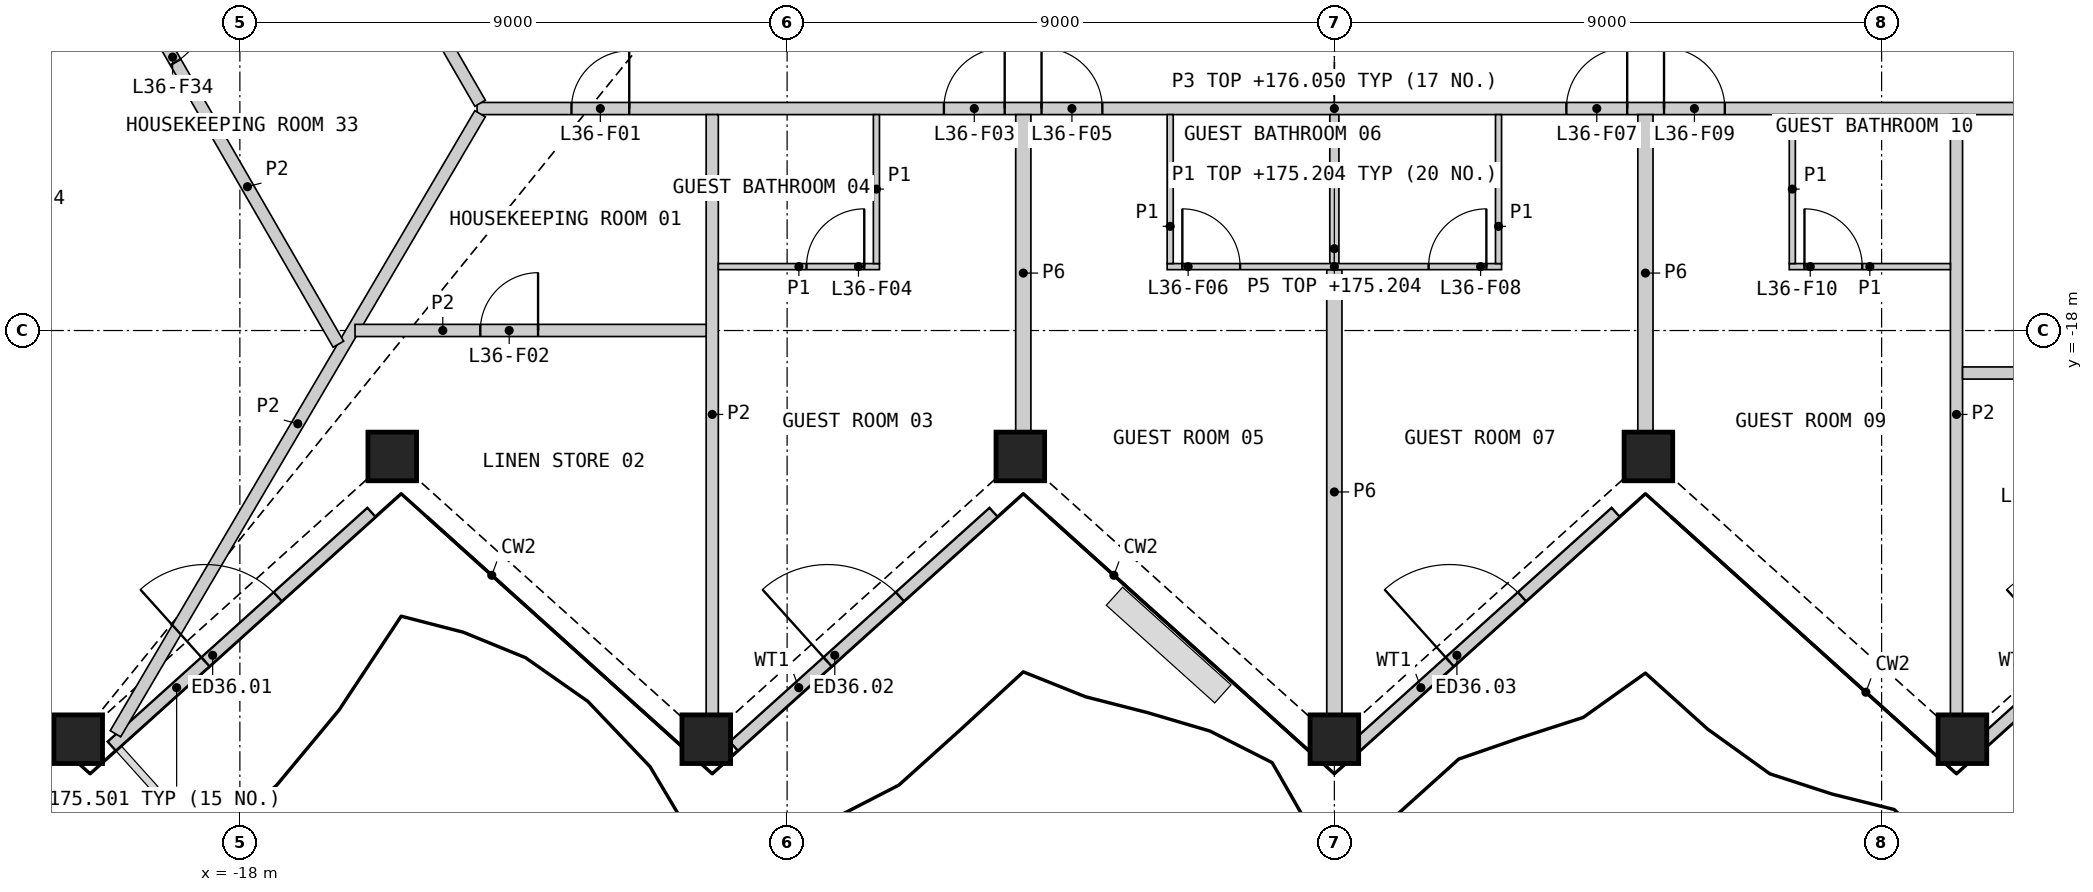
"""IFC4 building model, lengths in metres.
Left out: names, types, materials, properties, quantities, classifications, styles, units other than length and angle.
Written with IfcOpenShell. Run it as: python <this file> out.ifc"""

import sys

from ifc_helpers import new_model, si_unit, direction, frame, frame_2d, origin, origin_2d, place, context, subcontext, project, spatial, rectangle, hollow_rectangle, extrude, element, fill, save


model = new_model("IFC4")
c1 = context("Model", 3, precision=1e-05, world=origin(), true_north=direction((0.0, 1.0)))
c2 = subcontext(c1, "Body", "Model", "MODEL_VIEW")
j1 = project(units=[si_unit("LENGTHUNIT", "METRE"), si_unit("PLANEANGLEUNIT", "RADIAN")], contexts=[c1])
p1 = place(None, origin())
s1 = spatial("IfcSite", under=j1, at=p1, CompositionType="ELEMENT")
p2 = place(p1, origin())
s2 = spatial("IfcBuilding", under=s1, at=p2, CompositionType="ELEMENT")
p3 = place(p2, frame((0.0, 0.0, 172.8)))
s3 = spatial("IfcBuildingStorey", under=s2, at=p3, CompositionType="ELEMENT", Elevation=172.8)
for number, where, z_axis, x_axis in (
    (1, (-20.659, -24.722, 0.0), (0.0, 0.0, 1.0), (1.0, 0.0, 0.0)),
    (2, (-15.494, -20.071, 0.0), (0.0, 0.0, 1.0), (1.0, 0.0, 0.0)),
    (3, (-10.329, -24.722, 0.0), (0.0, 0.0, 1.0), (1.0, 0.0, 0.0)),
    (4, (-5.165, -20.071, 0.0), (0.0, 0.0, 1.0), (1.0, 0.0, 0.0)),
    (5, (0.0, -24.722, 0.0), (0.0, 0.0, 1.0), (1.0, 0.0, 0.0)),
    (6, (5.165, -20.071, 0.0), (0.0, 0.0, 1.0), (1.0, 0.0, 0.0)),
    (7, (10.329, -24.722, 0.0), (0.0, 0.0, 1.0), (1.0, 0.0, 0.0)),
):
    element("IfcColumn", number, at=place(p3, frame(where, z_axis=z_axis, x_axis=x_axis)), inside=s3, PredefinedType="COLUMN", context=c2, shape_type="SweptSolid", body=[
        extrude(hollow_rectangle(XDim=0.8, YDim=0.8, WallThickness=0.05, at=origin_2d()), origin(), (0.0, 0.0, 1.0), 3.6),
    ])
p4 = place(p3, frame((-20.108, -24.836, 0.0), z_axis=(0.0, 0.0, 1.0), x_axis=(0.74315473474, 0.669119600844, 0.0)))
e8 = element("IfcWall", 8, at=p4, inside=s3, PredefinedType="SOLIDWALL", context=c2, shape_type="SweptSolid", body=[
    extrude(rectangle(XDim=5.748, YDim=0.2, at=frame_2d((2.874, 0.0))), origin(), (0.0, 0.0, 1.0), 2.701),
])
p5 = place(p4, frame((2.074, 0.0, 0.0)))
e9 = element("IfcOpeningElement", 9, at=p5, cuts=e8, PredefinedType="OPENING", context=c2, shape_type="SweptSolid", body=[
    extrude(rectangle(XDim=1.6, YDim=2.4, at=frame_2d((0.8, 1.2))), frame((0.0, 0.11, 0.0), z_axis=(0.0, -1.0, 0.0), x_axis=(1.0, 0.0, 0.0)), (0.0, 0.0, 1.0), 0.22),
])
p6 = place(p3, frame((-9.876, -24.836, 0.0), z_axis=(0.0, 0.0, 1.0), x_axis=(0.74315473474, 0.669119600844, 0.0)))
e10 = element("IfcWall", 10, at=p6, inside=s3, PredefinedType="SOLIDWALL", context=c2, shape_type="SweptSolid", body=[
    extrude(rectangle(XDim=5.748, YDim=0.2, at=frame_2d((2.874, 0.0))), origin(), (0.0, 0.0, 1.0), 2.701),
])
p7 = place(p6, frame((2.074, 0.0, 0.0)))
e11 = element("IfcOpeningElement", 11, at=p7, cuts=e10, PredefinedType="OPENING", context=c2, shape_type="SweptSolid", body=[
    extrude(rectangle(XDim=1.6, YDim=2.4, at=frame_2d((0.8, 1.2))), frame((0.0, 0.11, 0.0), z_axis=(0.0, -1.0, 0.0), x_axis=(1.0, 0.0, 0.0)), (0.0, 0.0, 1.0), 0.22),
])
p8 = place(p3, frame((0.355, -24.836, 0.0), z_axis=(0.0, 0.0, 1.0), x_axis=(0.74315473474, 0.669119600844, 0.0)))
e12 = element("IfcWall", 12, at=p8, inside=s3, PredefinedType="SOLIDWALL", context=c2, shape_type="SweptSolid", body=[
    extrude(rectangle(XDim=5.748, YDim=0.2, at=frame_2d((2.874, 0.0))), origin(), (0.0, 0.0, 1.0), 2.701),
])
p9 = place(p8, frame((2.074, 0.0, 0.0)))
e13 = element("IfcOpeningElement", 13, at=p9, cuts=e12, PredefinedType="OPENING", context=c2, shape_type="SweptSolid", body=[
    extrude(rectangle(XDim=1.6, YDim=2.4, at=frame_2d((0.8, 1.2))), frame((0.0, 0.11, 0.0), z_axis=(0.0, -1.0, 0.0), x_axis=(1.0, 0.0, 0.0)), (0.0, 0.0, 1.0), 0.22),
])
p10 = place(p3, frame((10.587, -24.836, 0.0), z_axis=(0.0, 0.0, 1.0), x_axis=(0.74315473474, 0.669119600844, 0.0)))
e14 = element("IfcWall", 14, at=p10, inside=s3, PredefinedType="SOLIDWALL", context=c2, shape_type="SweptSolid", body=[
    extrude(rectangle(XDim=5.748, YDim=0.2, at=frame_2d((2.874, 0.0))), origin(), (0.0, 0.0, 1.0), 2.701),
])
p11 = place(p10, frame((2.074, 0.0, 0.0)))
e15 = element("IfcOpeningElement", 15, at=p11, cuts=e14, PredefinedType="OPENING", context=c2, shape_type="SweptSolid", body=[
    extrude(rectangle(XDim=1.6, YDim=2.4, at=frame_2d((0.8, 1.2))), frame((0.0, 0.11, 0.0), z_axis=(0.0, -1.0, 0.0), x_axis=(1.0, 0.0, 0.0)), (0.0, 0.0, 1.0), 0.22),
])
p12 = place(p3, frame((-14.099, -14.349, 0.0), z_axis=(0.0, 0.0, 1.0), x_axis=(1.0, 0.0, 0.0)))
e16 = element("IfcWall", 16, at=p12, inside=s3, PredefinedType="PARTITIONING", context=c2, shape_type="SweptSolid", body=[
    extrude(rectangle(XDim=28.198, YDim=0.2, at=frame_2d((14.099, 0.0))), origin(), (0.0, 0.0, 1.0), 3.25),
])
p13 = place(p12, frame((1.552, 0.0, 0.0)))
e17 = element("IfcOpeningElement", 17, at=p13, cuts=e16, PredefinedType="OPENING", context=c2, shape_type="SweptSolid", body=[
    extrude(rectangle(XDim=0.95, YDim=2.1, at=frame_2d((0.475, 1.05))), frame((0.0, 0.11, 0.0), z_axis=(0.0, -1.0, 0.0), x_axis=(1.0, 0.0, 0.0)), (0.0, 0.0, 1.0), 0.22),
])
p14 = place(p12, frame((7.677, 0.0, 0.0)))
e18 = element("IfcOpeningElement", 18, at=p14, cuts=e16, PredefinedType="OPENING", context=c2, shape_type="SweptSolid", body=[
    extrude(rectangle(XDim=1.0, YDim=2.1, at=frame_2d((0.5, 1.05))), frame((0.0, 0.11, 0.0), z_axis=(0.0, -1.0, 0.0), x_axis=(1.0, 0.0, 0.0)), (0.0, 0.0, 1.0), 0.22),
])
p15 = place(p12, frame((9.283, 0.0, 0.0)))
e19 = element("IfcOpeningElement", 19, at=p15, cuts=e16, PredefinedType="OPENING", context=c2, shape_type="SweptSolid", body=[
    extrude(rectangle(XDim=1.0, YDim=2.1, at=frame_2d((0.5, 1.05))), frame((0.0, 0.11, 0.0), z_axis=(0.0, -1.0, 0.0), x_axis=(1.0, 0.0, 0.0)), (0.0, 0.0, 1.0), 0.22),
])
p16 = place(p12, frame((17.915, 0.0, 0.0)))
e20 = element("IfcOpeningElement", 20, at=p16, cuts=e16, PredefinedType="OPENING", context=c2, shape_type="SweptSolid", body=[
    extrude(rectangle(XDim=1.0, YDim=2.1, at=frame_2d((0.5, 1.05))), frame((0.0, 0.11, 0.0), z_axis=(0.0, -1.0, 0.0), x_axis=(1.0, 0.0, 0.0)), (0.0, 0.0, 1.0), 0.22),
])
p17 = place(p12, frame((19.521, 0.0, 0.0)))
e21 = element("IfcOpeningElement", 21, at=p17, cuts=e16, PredefinedType="OPENING", context=c2, shape_type="SweptSolid", body=[
    extrude(rectangle(XDim=1.0, YDim=2.1, at=frame_2d((0.5, 1.05))), frame((0.0, 0.11, 0.0), z_axis=(0.0, -1.0, 0.0), x_axis=(1.0, 0.0, 0.0)), (0.0, 0.0, 1.0), 0.22),
])
p18 = place(p12, frame((25.696, 0.0, 0.0)))
e22 = element("IfcOpeningElement", 22, at=p18, cuts=e16, PredefinedType="OPENING", context=c2, shape_type="SweptSolid", body=[
    extrude(rectangle(XDim=0.95, YDim=2.1, at=frame_2d((0.475, 1.05))), frame((0.0, 0.11, 0.0), z_axis=(0.0, -1.0, 0.0), x_axis=(1.0, 0.0, 0.0)), (0.0, 0.0, 1.0), 0.22),
])
p19 = place(p3, frame((0.0, -24.312, 0.0), z_axis=(0.0, 0.0, 1.0), x_axis=(0.0, 1.0, 0.0)))
e23 = element("IfcWall", 23, at=p19, inside=s3, PredefinedType="PARTITIONING", context=c2, shape_type="SweptSolid", body=[
    extrude(rectangle(XDim=7.313, YDim=0.25, at=frame_2d((3.656, 0.0))), origin(), (0.0, 0.0, 1.0), 2.404),
])
for number, where, z_axis, x_axis in (
    (24, (-5.116, -19.661, 0.0), (0.0, 0.0, 1.0), (0.0, 1.0, 0.0)),
    (25, (5.116, -19.661, 0.0), (0.0, 0.0, 1.0), (0.0, 1.0, 0.0)),
):
    element("IfcWall", number, at=place(p3, frame(where, z_axis=z_axis, x_axis=x_axis)), inside=s3, PredefinedType="PARTITIONING", context=c2, shape_type="SweptSolid", body=[
        extrude(rectangle(XDim=5.212, YDim=0.25, at=frame_2d((2.606, 0.0))), origin(), (0.0, 0.0, 1.0), 2.404),
    ])
p20 = place(p3, frame((-15.55, -11.662, 0.0), z_axis=(0.0, 0.0, 1.0), x_axis=(0.500048608389, -0.865997337899, 0.0)))
e26 = element("IfcWall", 26, at=p20, inside=s3, PredefinedType="PARTITIONING", context=c2, shape_type="SweptSolid", body=[
    extrude(rectangle(XDim=3.002, YDim=0.2, at=frame_2d((1.501, 0.0))), origin(), (0.0, 0.0, 1.0), 3.25),
])
p21 = place(p3, frame((-20.046, -24.632, 0.0), z_axis=(0.0, 0.0, 1.0), x_axis=(0.50691549935, 0.86199575203, 0.0)))
e27 = element("IfcWall", 27, at=p21, inside=s3, PredefinedType="PARTITIONING", context=c2, shape_type="SweptSolid", body=[
    extrude(rectangle(XDim=11.83, YDim=0.2, at=frame_2d((5.915, 0.0))), origin(), (0.0, 0.0, 1.0), 2.404),
])
p22 = place(p3, frame((-22.363, -7.862, 0.0), z_axis=(0.0, 0.0, 1.0), x_axis=(0.500009728207, -0.866019787128, 0.0)))
e28 = element("IfcWall", 28, at=p22, inside=s3, PredefinedType="PARTITIONING", context=c2, shape_type="SweptSolid", body=[
    extrude(rectangle(XDim=11.967, YDim=0.2, at=frame_2d((5.983, 0.0))), origin(), (0.0, 0.0, 1.0), 2.404),
])
p23 = place(p22, frame((5.658, 0.0, 0.0)))
e29 = element("IfcOpeningElement", 29, at=p23, cuts=e28, PredefinedType="OPENING", context=c2, shape_type="SweptSolid", body=[
    extrude(rectangle(XDim=0.95, YDim=2.1, at=frame_2d((0.475, 1.05))), frame((0.0, 0.11, 0.0), z_axis=(0.0, -1.0, 0.0), x_axis=(1.0, 0.0, 0.0)), (0.0, 0.0, 1.0), 0.22),
])
for number, where, z_axis, x_axis in (
    (30, (-10.231, -24.312, 0.0), (0.0, 0.0, 1.0), (0.0, 1.0, 0.0)),
    (31, (10.231, -24.312, 0.0), (0.0, 0.0, 1.0), (0.0, 1.0, 0.0)),
):
    element("IfcWall", number, at=place(p3, frame(where, z_axis=z_axis, x_axis=x_axis)), inside=s3, PredefinedType="PARTITIONING", context=c2, shape_type="SweptSolid", body=[
        extrude(rectangle(XDim=9.863, YDim=0.2, at=frame_2d((4.931, 0.0))), origin(), (0.0, 0.0, 1.0), 2.404),
    ])
p24 = place(p3, frame((10.331, -18.699, 0.0), z_axis=(0.0, 0.0, 1.0), x_axis=(1.0, 0.0, 0.0)))
e32 = element("IfcWall", 32, at=p24, inside=s3, PredefinedType="PARTITIONING", context=c2, shape_type="SweptSolid", body=[
    extrude(rectangle(XDim=6.179, YDim=0.2, at=frame_2d((3.09, 0.0))), origin(), (0.0, 0.0, 1.0), 2.404),
])
p25 = place(p24, frame((2.866, 0.0, 0.0)))
e33 = element("IfcOpeningElement", 33, at=p25, cuts=e32, PredefinedType="OPENING", context=c2, shape_type="SweptSolid", body=[
    extrude(rectangle(XDim=0.95, YDim=2.1, at=frame_2d((0.475, 1.05))), frame((0.0, 0.11, 0.0), z_axis=(0.0, -1.0, 0.0), x_axis=(1.0, 0.0, 0.0)), (0.0, 0.0, 1.0), 0.22),
])
p26 = place(p3, frame((-16.106, -17.999, 0.0), z_axis=(0.0, 0.0, 1.0), x_axis=(1.0, 0.0, 0.0)))
e34 = element("IfcWall", 34, at=p26, inside=s3, PredefinedType="PARTITIONING", context=c2, shape_type="SweptSolid", body=[
    extrude(rectangle(XDim=5.775, YDim=0.2, at=frame_2d((2.887, 0.0))), origin(), (0.0, 0.0, 1.0), 2.404),
])
p27 = place(p26, frame((2.06, 0.0, 0.0)))
e35 = element("IfcOpeningElement", 35, at=p27, cuts=e34, PredefinedType="OPENING", context=c2, shape_type="SweptSolid", body=[
    extrude(rectangle(XDim=0.95, YDim=2.1, at=frame_2d((0.475, 1.05))), frame((0.0, 0.11, 0.0), z_axis=(0.0, -1.0, 0.0), x_axis=(1.0, 0.0, 0.0)), (0.0, 0.0, 1.0), 0.22),
])
p28 = place(p3, frame((0.0, -16.899, 0.0), z_axis=(0.0, 0.0, 1.0), x_axis=(0.0, 1.0, 0.0)))
e36 = element("IfcWall", 36, at=p28, inside=s3, PredefinedType="PLUMBINGWALL", context=c2, shape_type="SweptSolid", body=[
    extrude(rectangle(XDim=2.45, YDim=0.15, at=frame_2d((1.225, 0.0))), origin(), (0.0, 0.0, 1.0), 2.404),
])
p29 = place(p3, frame((-2.75, -16.949, 0.0), z_axis=(0.0, 0.0, 1.0), x_axis=(1.0, 0.0, 0.0)))
e37 = element("IfcWall", 37, at=p29, inside=s3, PredefinedType="PARTITIONING", context=c2, shape_type="SweptSolid", body=[
    extrude(rectangle(XDim=5.5, YDim=0.1, at=frame_2d((2.75, 0.0))), origin(), (0.0, 0.0, 1.0), 2.404),
])
p30 = place(p29, frame((0.25, 0.0, 0.0)))
e38 = element("IfcOpeningElement", 38, at=p30, cuts=e37, PredefinedType="OPENING", context=c2, shape_type="SweptSolid", body=[
    extrude(rectangle(XDim=0.95, YDim=2.1, at=frame_2d((0.475, 1.05))), frame((0.0, 0.06, 0.0), z_axis=(0.0, -1.0, 0.0), x_axis=(1.0, 0.0, 0.0)), (0.0, 0.0, 1.0), 0.12),
])
p31 = place(p29, frame((4.3, 0.0, 0.0)))
e39 = element("IfcOpeningElement", 39, at=p31, cuts=e37, PredefinedType="OPENING", context=c2, shape_type="SweptSolid", body=[
    extrude(rectangle(XDim=0.95, YDim=2.1, at=frame_2d((0.475, 1.05))), frame((0.0, 0.06, 0.0), z_axis=(0.0, -1.0, 0.0), x_axis=(1.0, 0.0, 0.0)), (0.0, 0.0, 1.0), 0.12),
])
p32 = place(p3, frame((-10.131, -16.949, 0.0), z_axis=(0.0, 0.0, 1.0), x_axis=(1.0, 0.0, 0.0)))
e40 = element("IfcWall", 40, at=p32, inside=s3, PredefinedType="PARTITIONING", context=c2, shape_type="SweptSolid", body=[
    extrude(rectangle(XDim=2.65, YDim=0.1, at=frame_2d((1.325, 0.0))), origin(), (0.0, 0.0, 1.0), 2.404),
])
p33 = place(p32, frame((1.45, 0.0, 0.0)))
e41 = element("IfcOpeningElement", 41, at=p33, cuts=e40, PredefinedType="OPENING", context=c2, shape_type="SweptSolid", body=[
    extrude(rectangle(XDim=0.95, YDim=2.1, at=frame_2d((0.475, 1.05))), frame((0.0, 0.06, 0.0), z_axis=(0.0, -1.0, 0.0), x_axis=(1.0, 0.0, 0.0)), (0.0, 0.0, 1.0), 0.12),
])
p34 = place(p3, frame((7.481, -16.949, 0.0), z_axis=(0.0, 0.0, 1.0), x_axis=(1.0, 0.0, 0.0)))
e42 = element("IfcWall", 42, at=p34, inside=s3, PredefinedType="PARTITIONING", context=c2, shape_type="SweptSolid", body=[
    extrude(rectangle(XDim=2.65, YDim=0.1, at=frame_2d((1.325, 0.0))), origin(), (0.0, 0.0, 1.0), 2.404),
])
p35 = place(p34, frame((0.25, 0.0, 0.0)))
e43 = element("IfcOpeningElement", 43, at=p35, cuts=e42, PredefinedType="OPENING", context=c2, shape_type="SweptSolid", body=[
    extrude(rectangle(XDim=0.95, YDim=2.1, at=frame_2d((0.475, 1.05))), frame((0.0, 0.06, 0.0), z_axis=(0.0, -1.0, 0.0), x_axis=(1.0, 0.0, 0.0)), (0.0, 0.0, 1.0), 0.12),
])
for number, where, z_axis, x_axis in (
    (44, (-7.531, -16.899, 0.0), (0.0, 0.0, 1.0), (0.0, 1.0, 0.0)),
    (45, (-2.7, -16.899, 0.0), (0.0, 0.0, 1.0), (0.0, 1.0, 0.0)),
    (46, (2.7, -16.899, 0.0), (0.0, 0.0, 1.0), (0.0, 1.0, 0.0)),
    (47, (7.531, -16.899, 0.0), (0.0, 0.0, 1.0), (0.0, 1.0, 0.0)),
):
    element("IfcWall", number, at=place(p3, frame(where, z_axis=z_axis, x_axis=x_axis)), inside=s3, PredefinedType="PARTITIONING", context=c2, shape_type="SweptSolid", body=[
        extrude(rectangle(XDim=2.45, YDim=0.1, at=frame_2d((1.225, 0.0))), origin(), (0.0, 0.0, 1.0), 2.404),
    ])
p36 = place(p5, origin())
e48 = element("IfcDoor", 48, at=p36, inside=s3, OperationType="DOUBLE_DOOR_SINGLE_SWING", PredefinedType="DOOR", context=c2, shape_type="SweptSolid", body=[
    extrude(rectangle(XDim=1.6, YDim=2.4, at=frame_2d((0.8, 1.2))), frame((0.0, 0.025, 0.0), z_axis=(0.0, -1.0, 0.0), x_axis=(1.0, 0.0, 0.0)), (0.0, 0.0, 1.0), 0.05),
])
fill(e9, e48)
p37 = place(p7, origin())
e49 = element("IfcDoor", 49, at=p37, inside=s3, OperationType="DOUBLE_DOOR_SINGLE_SWING", PredefinedType="DOOR", context=c2, shape_type="SweptSolid", body=[
    extrude(rectangle(XDim=1.6, YDim=2.4, at=frame_2d((0.8, 1.2))), frame((0.0, 0.025, 0.0), z_axis=(0.0, -1.0, 0.0), x_axis=(1.0, 0.0, 0.0)), (0.0, 0.0, 1.0), 0.05),
])
fill(e11, e49)
p38 = place(p9, origin())
e50 = element("IfcDoor", 50, at=p38, inside=s3, OperationType="DOUBLE_DOOR_SINGLE_SWING", PredefinedType="DOOR", context=c2, shape_type="SweptSolid", body=[
    extrude(rectangle(XDim=1.6, YDim=2.4, at=frame_2d((0.8, 1.2))), frame((0.0, 0.025, 0.0), z_axis=(0.0, -1.0, 0.0), x_axis=(1.0, 0.0, 0.0)), (0.0, 0.0, 1.0), 0.05),
])
fill(e13, e50)
p39 = place(p13, origin())
e51 = element("IfcDoor", 51, at=p39, inside=s3, OperationType="SINGLE_SWING_RIGHT", PredefinedType="DOOR", context=c2, shape_type="SweptSolid", body=[
    extrude(rectangle(XDim=0.95, YDim=2.1, at=frame_2d((0.475, 1.05))), frame((0.0, 0.025, 0.0), z_axis=(0.0, -1.0, 0.0), x_axis=(1.0, 0.0, 0.0)), (0.0, 0.0, 1.0), 0.05),
])
fill(e17, e51)
p40 = place(p27, origin())
e52 = element("IfcDoor", 52, at=p40, inside=s3, OperationType="SINGLE_SWING_RIGHT", PredefinedType="DOOR", context=c2, shape_type="SweptSolid", body=[
    extrude(rectangle(XDim=0.95, YDim=2.1, at=frame_2d((0.475, 1.05))), frame((0.0, 0.025, 0.0), z_axis=(0.0, -1.0, 0.0), x_axis=(1.0, 0.0, 0.0)), (0.0, 0.0, 1.0), 0.05),
])
fill(e35, e52)
p41 = place(p14, origin())
e53 = element("IfcDoor", 53, at=p41, inside=s3, OperationType="SINGLE_SWING_RIGHT", PredefinedType="DOOR", context=c2, shape_type="SweptSolid", body=[
    extrude(rectangle(XDim=1.0, YDim=2.1, at=frame_2d((0.5, 1.05))), frame((0.0, 0.025, 0.0), z_axis=(0.0, -1.0, 0.0), x_axis=(1.0, 0.0, 0.0)), (0.0, 0.0, 1.0), 0.05),
])
fill(e18, e53)
p42 = place(p33, origin())
e54 = element("IfcDoor", 54, at=p42, inside=s3, OperationType="SINGLE_SWING_RIGHT", PredefinedType="DOOR", context=c2, shape_type="SweptSolid", body=[
    extrude(rectangle(XDim=0.95, YDim=2.1, at=frame_2d((0.475, 1.05))), frame((0.0, 0.025, 0.0), z_axis=(0.0, -1.0, 0.0), x_axis=(1.0, 0.0, 0.0)), (0.0, 0.0, 1.0), 0.05),
])
fill(e41, e54)
p43 = place(p15, origin())
e55 = element("IfcDoor", 55, at=p43, inside=s3, OperationType="SINGLE_SWING_LEFT", PredefinedType="DOOR", context=c2, shape_type="SweptSolid", body=[
    extrude(rectangle(XDim=1.0, YDim=2.1, at=frame_2d((0.5, 1.05))), frame((0.0, 0.025, 0.0), z_axis=(0.0, -1.0, 0.0), x_axis=(1.0, 0.0, 0.0)), (0.0, 0.0, 1.0), 0.05),
])
fill(e19, e55)
p44 = place(p30, origin())
e56 = element("IfcDoor", 56, at=p44, inside=s3, OperationType="SINGLE_SWING_LEFT", PredefinedType="DOOR", context=c2, shape_type="SweptSolid", body=[
    extrude(rectangle(XDim=0.95, YDim=2.1, at=frame_2d((0.475, 1.05))), frame((0.0, 0.025, 0.0), z_axis=(0.0, -1.0, 0.0), x_axis=(1.0, 0.0, 0.0)), (0.0, 0.0, 1.0), 0.05),
])
fill(e38, e56)
p45 = place(p16, origin())
e57 = element("IfcDoor", 57, at=p45, inside=s3, OperationType="SINGLE_SWING_RIGHT", PredefinedType="DOOR", context=c2, shape_type="SweptSolid", body=[
    extrude(rectangle(XDim=1.0, YDim=2.1, at=frame_2d((0.5, 1.05))), frame((0.0, 0.025, 0.0), z_axis=(0.0, -1.0, 0.0), x_axis=(1.0, 0.0, 0.0)), (0.0, 0.0, 1.0), 0.05),
])
fill(e20, e57)
p46 = place(p31, origin())
e58 = element("IfcDoor", 58, at=p46, inside=s3, OperationType="SINGLE_SWING_RIGHT", PredefinedType="DOOR", context=c2, shape_type="SweptSolid", body=[
    extrude(rectangle(XDim=0.95, YDim=2.1, at=frame_2d((0.475, 1.05))), frame((0.0, 0.025, 0.0), z_axis=(0.0, -1.0, 0.0), x_axis=(1.0, 0.0, 0.0)), (0.0, 0.0, 1.0), 0.05),
])
fill(e39, e58)
p47 = place(p17, origin())
e59 = element("IfcDoor", 59, at=p47, inside=s3, OperationType="SINGLE_SWING_LEFT", PredefinedType="DOOR", context=c2, shape_type="SweptSolid", body=[
    extrude(rectangle(XDim=1.0, YDim=2.1, at=frame_2d((0.5, 1.05))), frame((0.0, 0.025, 0.0), z_axis=(0.0, -1.0, 0.0), x_axis=(1.0, 0.0, 0.0)), (0.0, 0.0, 1.0), 0.05),
])
fill(e21, e59)
p48 = place(p35, origin())
e60 = element("IfcDoor", 60, at=p48, inside=s3, OperationType="SINGLE_SWING_LEFT", PredefinedType="DOOR", context=c2, shape_type="SweptSolid", body=[
    extrude(rectangle(XDim=0.95, YDim=2.1, at=frame_2d((0.475, 1.05))), frame((0.0, 0.025, 0.0), z_axis=(0.0, -1.0, 0.0), x_axis=(1.0, 0.0, 0.0)), (0.0, 0.0, 1.0), 0.05),
])
fill(e43, e60)
p49 = place(p23, origin())
e61 = element("IfcDoor", 61, at=p49, inside=s3, OperationType="SINGLE_SWING_LEFT", PredefinedType="DOOR", context=c2, shape_type="SweptSolid", body=[
    extrude(rectangle(XDim=0.95, YDim=2.1, at=frame_2d((0.475, 1.05))), frame((0.0, 0.025, 0.0), z_axis=(0.0, -1.0, 0.0), x_axis=(1.0, 0.0, 0.0)), (0.0, 0.0, 1.0), 0.05),
])
fill(e29, e61)
save(model, sys.argv[1])
